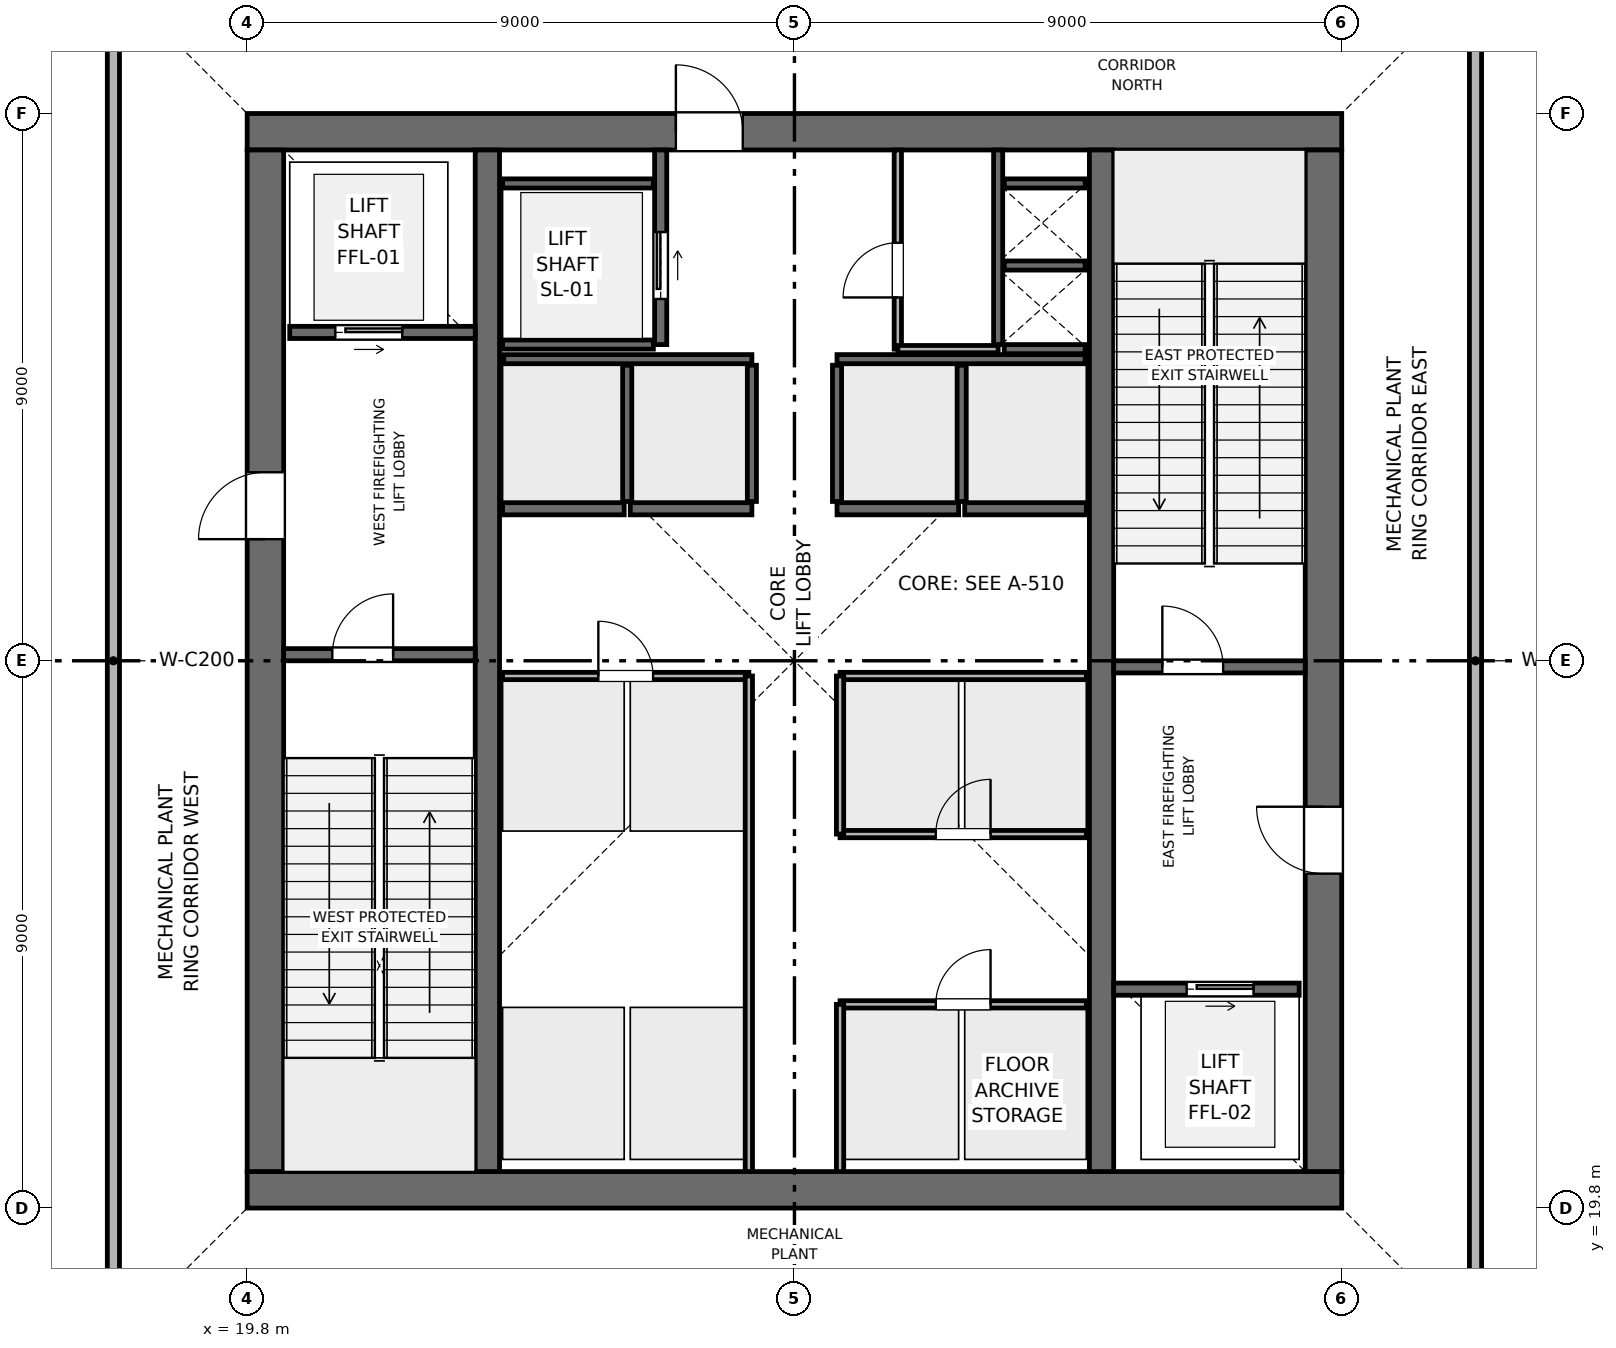
"""IFC4 building model, lengths in metres.
Left out: names, types, materials, properties, quantities, classifications, styles, units other than length and angle.
Written with IfcOpenShell. Run it as: python <this file> out.ifc"""

import sys

from ifc_helpers import new_model, si_unit, direction, frame, frame_2d, origin, place, context, subcontext, project, spatial, rectangle, extrude, element, fill, save


model = new_model("IFC4")
c1 = context("Model", 3, precision=1e-05, world=origin(), true_north=direction((0.0, 1.0)))
c2 = subcontext(c1, "Body", "Model", "MODEL_VIEW")
j1 = project(units=[si_unit("LENGTHUNIT", "METRE"), si_unit("PLANEANGLEUNIT", "RADIAN")], contexts=[c1])
p1 = place(None, origin())
s1 = spatial("IfcSite", under=j1, at=p1, CompositionType="ELEMENT")
p2 = place(p1, origin())
s2 = spatial("IfcBuilding", under=s1, at=p2, CompositionType="ELEMENT")
p3 = place(p2, frame((0.0, 0.0, 289.5)))
s3 = spatial("IfcBuildingStorey", under=s2, at=p3, CompositionType="ELEMENT", Elevation=289.5)
p4 = place(p3, frame((19.8, 20.1, 0.0), z_axis=(0.0, 0.0, 1.0), x_axis=(1.0, 0.0, 0.0)))
e1 = element("IfcWall", 1, at=p4, inside=s3, PredefinedType="SHEAR", context=c2, shape_type="SweptSolid", body=[
    extrude(rectangle(XDim=18.0, YDim=0.6, at=frame_2d((9.0, 0.0))), origin(), (0.0, 0.0, 1.0), 6.0),
])
p5 = place(p3, frame((19.8, 37.5, 0.0), z_axis=(0.0, 0.0, 1.0), x_axis=(1.0, 0.0, 0.0)))
e2 = element("IfcWall", 2, at=p5, inside=s3, PredefinedType="SHEAR", context=c2, shape_type="SweptSolid", body=[
    extrude(rectangle(XDim=18.0, YDim=0.6, at=frame_2d((9.0, 0.0))), origin(), (0.0, 0.0, 1.0), 6.0),
])
p6 = place(p5, frame((7.05, 0.0, 0.0)))
e3 = element("IfcOpeningElement", 3, at=p6, cuts=e2, PredefinedType="OPENING", context=c2, shape_type="SweptSolid", body=[
    extrude(rectangle(XDim=1.1, YDim=2.15, at=frame_2d((0.55, 1.075))), frame((0.0, 0.31, 0.0), z_axis=(0.0, -1.0, 0.0), x_axis=(1.0, 0.0, 0.0)), (0.0, 0.0, 1.0), 0.62),
])
p7 = place(p3, frame((20.1, 20.4, 0.0), z_axis=(0.0, 0.0, 1.0), x_axis=(0.0, 1.0, 0.0)))
e4 = element("IfcWall", 4, at=p7, inside=s3, PredefinedType="SHEAR", context=c2, shape_type="SweptSolid", body=[
    extrude(rectangle(XDim=16.8, YDim=0.6, at=frame_2d((8.4, 0.0))), origin(), (0.0, 0.0, 1.0), 6.0),
])
p8 = place(p7, frame((10.4, 0.0, 0.0)))
e5 = element("IfcOpeningElement", 5, at=p8, cuts=e4, PredefinedType="OPENING", context=c2, shape_type="SweptSolid", body=[
    extrude(rectangle(XDim=1.1, YDim=2.15, at=frame_2d((0.55, 1.075))), frame((0.0, 0.31, 0.0), z_axis=(0.0, -1.0, 0.0), x_axis=(1.0, 0.0, 0.0)), (0.0, 0.0, 1.0), 0.62),
])
p9 = place(p3, frame((37.5, 20.4, 0.0), z_axis=(0.0, 0.0, 1.0), x_axis=(0.0, 1.0, 0.0)))
e6 = element("IfcWall", 6, at=p9, inside=s3, PredefinedType="SHEAR", context=c2, shape_type="SweptSolid", body=[
    extrude(rectangle(XDim=16.8, YDim=0.6, at=frame_2d((8.4, 0.0))), origin(), (0.0, 0.0, 1.0), 6.0),
])
p10 = place(p9, frame((4.9, 0.0, 0.0)))
e7 = element("IfcOpeningElement", 7, at=p10, cuts=e6, PredefinedType="OPENING", context=c2, shape_type="SweptSolid", body=[
    extrude(rectangle(XDim=1.1, YDim=2.15, at=frame_2d((0.55, 1.075))), frame((0.0, 0.31, 0.0), z_axis=(0.0, -1.0, 0.0), x_axis=(1.0, 0.0, 0.0)), (0.0, 0.0, 1.0), 0.62),
])
for number, where, z_axis, x_axis in (
    (8, (23.75, 20.4, 0.0), (0.0, 0.0, 1.0), (0.0, 1.0, 0.0)),
    (9, (33.85, 20.4, 0.0), (0.0, 0.0, 1.0), (0.0, 1.0, 0.0)),
):
    element("IfcWall", number, at=place(p3, frame(where, z_axis=z_axis, x_axis=x_axis)), inside=s3, PredefinedType="SHEAR", context=c2, shape_type="SweptSolid", body=[
        extrude(rectangle(XDim=16.8, YDim=0.4, at=frame_2d((8.4, 0.0))), origin(), (0.0, 0.0, 1.0), 6.0),
    ])
p11 = place(p3, frame((20.4, 28.9, 0.0), z_axis=(0.0, 0.0, 1.0), x_axis=(1.0, 0.0, 0.0)))
e10 = element("IfcWall", 10, at=p11, inside=s3, PredefinedType="SHEAR", context=c2, shape_type="SweptSolid", body=[
    extrude(rectangle(XDim=3.15, YDim=0.2, at=frame_2d((1.575, 0.0))), origin(), (0.0, 0.0, 1.0), 5.76),
])
p12 = place(p11, frame((0.8, 0.0, 0.0)))
e11 = element("IfcOpeningElement", 11, at=p12, cuts=e10, PredefinedType="OPENING", context=c2, shape_type="SweptSolid", body=[
    extrude(rectangle(XDim=1.0, YDim=2.1, at=frame_2d((0.5, 1.05))), frame((0.0, 0.11, 0.0), z_axis=(0.0, -1.0, 0.0), x_axis=(1.0, 0.0, 0.0)), (0.0, 0.0, 1.0), 0.22),
])
p13 = place(p3, frame((34.05, 28.7, 0.0), z_axis=(0.0, 0.0, 1.0), x_axis=(1.0, 0.0, 0.0)))
e12 = element("IfcWall", 12, at=p13, inside=s3, PredefinedType="SHEAR", context=c2, shape_type="SweptSolid", body=[
    extrude(rectangle(XDim=3.15, YDim=0.2, at=frame_2d((1.575, 0.0))), origin(), (0.0, 0.0, 1.0), 5.76),
])
p14 = place(p13, frame((0.8, 0.0, 0.0)))
e13 = element("IfcOpeningElement", 13, at=p14, cuts=e12, PredefinedType="OPENING", context=c2, shape_type="SweptSolid", body=[
    extrude(rectangle(XDim=1.0, YDim=2.1, at=frame_2d((0.5, 1.05))), frame((0.0, 0.11, 0.0), z_axis=(0.0, -1.0, 0.0), x_axis=(1.0, 0.0, 0.0)), (0.0, 0.0, 1.0), 0.22),
])
p15 = place(p3, frame((32.15, 34.0, 0.0), z_axis=(0.0, 0.0, 1.0), x_axis=(0.0, 1.0, 0.0)))
e14 = element("IfcWall", 14, at=p15, inside=s3, PredefinedType="SHEAR", context=c2, shape_type="SweptSolid", body=[
    extrude(rectangle(XDim=3.2, YDim=0.15, at=frame_2d((1.6, 0.0))), origin(), (0.0, 0.0, 1.0), 5.76),
])
for number, where, z_axis, x_axis in (
    (15, (32.25, 33.925, 0.0), (0.0, 0.0, 1.0), (1.0, 0.0, 0.0)),
    (16, (32.25, 35.3, 0.0), (0.0, 0.0, 1.0), (1.0, 0.0, 0.0)),
):
    element("IfcWall", number, at=place(p3, frame(where, z_axis=z_axis, x_axis=x_axis)), inside=s3, PredefinedType="SHEAR", context=c2, shape_type="SweptSolid", body=[
        extrude(rectangle(XDim=1.33, YDim=0.15, at=frame_2d((0.665, 0.0))), origin(), (0.0, 0.0, 1.0), 5.76),
    ])
p16 = place(p3, frame((20.5, 34.2, 0.0), z_axis=(0.0, 0.0, 1.0), x_axis=(1.0, 0.0, 0.0)))
e17 = element("IfcWall", 17, at=p16, inside=s3, PredefinedType="SHEAR", context=c2, shape_type="SweptSolid", body=[
    extrude(rectangle(XDim=3.05, YDim=0.2, at=frame_2d((1.525, 0.0))), origin(), (0.0, 0.0, 1.0), 5.76),
])
p17 = place(p16, frame((0.75, 0.0, 0.0)))
e18 = element("IfcOpeningElement", 18, at=p17, cuts=e17, PredefinedType="OPENING", context=c2, shape_type="SweptSolid", body=[
    extrude(rectangle(XDim=1.1, YDim=2.15, at=frame_2d((0.55, 1.075))), frame((0.0, 0.11, 0.0), z_axis=(0.0, -1.0, 0.0), x_axis=(1.0, 0.0, 0.0)), (0.0, 0.0, 1.0), 0.22),
])
p18 = place(p3, frame((34.05, 23.4, 0.0), z_axis=(0.0, 0.0, 1.0), x_axis=(1.0, 0.0, 0.0)))
e19 = element("IfcWall", 19, at=p18, inside=s3, PredefinedType="SHEAR", context=c2, shape_type="SweptSolid", body=[
    extrude(rectangle(XDim=3.05, YDim=0.2, at=frame_2d((1.525, 0.0))), origin(), (0.0, 0.0, 1.0), 5.76),
])
p19 = place(p18, frame((1.2, 0.0, 0.0)))
e20 = element("IfcOpeningElement", 20, at=p19, cuts=e19, PredefinedType="OPENING", context=c2, shape_type="SweptSolid", body=[
    extrude(rectangle(XDim=1.1, YDim=2.15, at=frame_2d((0.55, 1.075))), frame((0.0, 0.11, 0.0), z_axis=(0.0, -1.0, 0.0), x_axis=(1.0, 0.0, 0.0)), (0.0, 0.0, 1.0), 0.22),
])
p20 = place(p3, frame((26.6, 34.0, 0.0), z_axis=(0.0, 0.0, 1.0), x_axis=(0.0, 1.0, 0.0)))
e21 = element("IfcWall", 21, at=p20, inside=s3, PredefinedType="SHEAR", context=c2, shape_type="SweptSolid", body=[
    extrude(rectangle(XDim=3.2, YDim=0.2, at=frame_2d((1.6, 0.0))), origin(), (0.0, 0.0, 1.0), 5.76),
])
p21 = place(p20, frame((0.75, 0.0, 0.0)))
e22 = element("IfcOpeningElement", 22, at=p21, cuts=e21, PredefinedType="OPENING", context=c2, shape_type="SweptSolid", body=[
    extrude(rectangle(XDim=1.1, YDim=2.15, at=frame_2d((0.55, 1.075))), frame((0.0, 0.11, 0.0), z_axis=(0.0, -1.0, 0.0), x_axis=(1.0, 0.0, 0.0)), (0.0, 0.0, 1.0), 0.22),
])
for number, where, z_axis, x_axis in (
    (23, (24.0, 34.0, 0.0), (0.0, 0.0, 1.0), (1.0, 0.0, 0.0)),
    (24, (24.0, 36.65, 0.0), (0.0, 0.0, 1.0), (1.0, 0.0, 0.0)),
):
    element("IfcWall", number, at=place(p3, frame(where, z_axis=z_axis, x_axis=x_axis)), inside=s3, PredefinedType="SHEAR", context=c2, shape_type="SweptSolid", body=[
        extrude(rectangle(XDim=2.48, YDim=0.15, at=frame_2d((1.24, 0.0))), origin(), (0.0, 0.0, 1.0), 5.76),
    ])
for number, where, z_axis, x_axis in (
    (25, (24.0, 31.3, 0.0), (0.0, 0.0, 1.0), (1.0, 0.0, 0.0)),
    (26, (26.1, 31.3, 0.0), (0.0, 0.0, 1.0), (1.0, 0.0, 0.0)),
    (27, (29.5, 31.3, 0.0), (0.0, 0.0, 1.0), (1.0, 0.0, 0.0)),
    (28, (31.6, 31.3, 0.0), (0.0, 0.0, 1.0), (1.0, 0.0, 0.0)),
):
    element("IfcWall", number, at=place(p3, frame(where, z_axis=z_axis, x_axis=x_axis)), inside=s3, PredefinedType="SHEAR", context=c2, shape_type="SweptSolid", body=[
        extrude(rectangle(XDim=2.0, YDim=0.2, at=frame_2d((1.0, 0.0))), origin(), (0.0, 0.0, 1.0), 5.76),
    ])
p22 = place(p3, frame((32.25, 36.65, 0.0), z_axis=(0.0, 0.0, 1.0), x_axis=(1.0, 0.0, 0.0)))
e29 = element("IfcWall", 29, at=p22, inside=s3, PredefinedType="SHEAR", context=c2, shape_type="SweptSolid", body=[
    extrude(rectangle(XDim=1.33, YDim=0.15, at=frame_2d((0.665, 0.0))), origin(), (0.0, 0.0, 1.0), 5.76),
])
for number, where, z_axis, x_axis in (
    (30, (24.02, 33.76, 0.0), (0.0, 0.0, 1.0), (1.0, 0.0, 0.0)),
    (31, (29.5, 33.76, 0.0), (0.0, 0.0, 1.0), (1.0, 0.0, 0.0)),
):
    element("IfcWall", number, at=place(p3, frame(where, z_axis=z_axis, x_axis=x_axis)), inside=s3, PredefinedType="SHEAR", context=c2, shape_type="SweptSolid", body=[
        extrude(rectangle(XDim=4.08, YDim=0.15, at=frame_2d((2.04, 0.0))), origin(), (0.0, 0.0, 1.0), 5.76),
    ])
for number, where, z_axis, x_axis in (
    (32, (26.05, 31.42, 0.0), (0.0, 0.0, 1.0), (0.0, 1.0, 0.0)),
    (33, (28.1, 31.42, 0.0), (0.0, 0.0, 1.0), (0.0, 1.0, 0.0)),
    (34, (29.5, 31.42, 0.0), (0.0, 0.0, 1.0), (0.0, 1.0, 0.0)),
    (35, (31.55, 31.42, 0.0), (0.0, 0.0, 1.0), (0.0, 1.0, 0.0)),
):
    element("IfcWall", number, at=place(p3, frame(where, z_axis=z_axis, x_axis=x_axis)), inside=s3, PredefinedType="SHEAR", context=c2, shape_type="SweptSolid", body=[
        extrude(rectangle(XDim=2.24, YDim=0.15, at=frame_2d((1.12, 0.0))), origin(), (0.0, 0.0, 1.0), 5.76),
    ])
p23 = place(p3, frame((30.5, 33.925, 0.0), z_axis=(0.0, 0.0, 1.0), x_axis=(0.0, 1.0, 0.0)))
e36 = element("IfcWall", 36, at=p23, inside=s3, PredefinedType="PARTITIONING", context=c2, shape_type="SweptSolid", body=[
    extrude(rectangle(XDim=3.275, YDim=0.12, at=frame_2d((1.637, 0.0))), origin(), (0.0, 0.0, 1.0), 5.76),
])
p24 = place(p23, frame((0.85, 0.0, 0.0)))
e37 = element("IfcOpeningElement", 37, at=p24, cuts=e36, PredefinedType="OPENING", context=c2, shape_type="SweptSolid", body=[
    extrude(rectangle(XDim=0.9, YDim=2.1, at=frame_2d((0.45, 1.05))), frame((0.0, 0.07, 0.0), z_axis=(0.0, -1.0, 0.0), x_axis=(1.0, 0.0, 0.0)), (0.0, 0.0, 1.0), 0.14),
])
p25 = place(p3, frame((30.5, 33.925, 0.0), z_axis=(0.0, 0.0, 1.0), x_axis=(1.0, 0.0, 0.0)))
e38 = element("IfcWall", 38, at=p25, inside=s3, PredefinedType="PARTITIONING", context=c2, shape_type="SweptSolid", body=[
    extrude(rectangle(XDim=1.65, YDim=0.12, at=frame_2d((0.825, 0.0))), origin(), (0.0, 0.0, 1.0), 5.76),
])
p26 = place(p3, frame((24.0, 28.55, 0.0), z_axis=(0.0, 0.0, 1.0), x_axis=(1.0, 0.0, 0.0)))
e39 = element("IfcWall", 39, at=p26, inside=s3, PredefinedType="PARTITIONING", context=c2, shape_type="SweptSolid", body=[
    extrude(rectangle(XDim=4.05, YDim=0.12, at=frame_2d((2.025, 0.0))), origin(), (0.0, 0.0, 1.0), 5.76),
])
p27 = place(p26, frame((1.575, 0.0, 0.0)))
e40 = element("IfcOpeningElement", 40, at=p27, cuts=e39, PredefinedType="OPENING", context=c2, shape_type="SweptSolid", body=[
    extrude(rectangle(XDim=0.9, YDim=2.1, at=frame_2d((0.45, 1.05))), frame((0.0, 0.07, 0.0), z_axis=(0.0, -1.0, 0.0), x_axis=(1.0, 0.0, 0.0)), (0.0, 0.0, 1.0), 0.14),
])
p28 = place(p3, frame((28.05, 20.4, 0.0), z_axis=(0.0, 0.0, 1.0), x_axis=(0.0, 1.0, 0.0)))
e41 = element("IfcWall", 41, at=p28, inside=s3, PredefinedType="PARTITIONING", context=c2, shape_type="SweptSolid", body=[
    extrude(rectangle(XDim=8.15, YDim=0.12, at=frame_2d((4.075, 0.0))), origin(), (0.0, 0.0, 1.0), 5.76),
])
p29 = place(p3, frame((29.55, 23.15, 0.0), z_axis=(0.0, 0.0, 1.0), x_axis=(1.0, 0.0, 0.0)))
e42 = element("IfcWall", 42, at=p29, inside=s3, PredefinedType="PARTITIONING", context=c2, shape_type="SweptSolid", body=[
    extrude(rectangle(XDim=4.05, YDim=0.12, at=frame_2d((2.025, 0.0))), origin(), (0.0, 0.0, 1.0), 5.76),
])
p30 = place(p29, frame((1.575, 0.0, 0.0)))
e43 = element("IfcOpeningElement", 43, at=p30, cuts=e42, PredefinedType="OPENING", context=c2, shape_type="SweptSolid", body=[
    extrude(rectangle(XDim=0.9, YDim=2.1, at=frame_2d((0.45, 1.05))), frame((0.0, 0.07, 0.0), z_axis=(0.0, -1.0, 0.0), x_axis=(1.0, 0.0, 0.0)), (0.0, 0.0, 1.0), 0.14),
])
p31 = place(p3, frame((29.55, 20.4, 0.0), z_axis=(0.0, 0.0, 1.0), x_axis=(0.0, 1.0, 0.0)))
e44 = element("IfcWall", 44, at=p31, inside=s3, PredefinedType="PARTITIONING", context=c2, shape_type="SweptSolid", body=[
    extrude(rectangle(XDim=2.75, YDim=0.12, at=frame_2d((1.375, 0.0))), origin(), (0.0, 0.0, 1.0), 5.76),
])
p32 = place(p3, frame((29.55, 25.95, 0.0), z_axis=(0.0, 0.0, 1.0), x_axis=(1.0, 0.0, 0.0)))
e45 = element("IfcWall", 45, at=p32, inside=s3, PredefinedType="PARTITIONING", context=c2, shape_type="SweptSolid", body=[
    extrude(rectangle(XDim=4.05, YDim=0.12, at=frame_2d((2.025, 0.0))), origin(), (0.0, 0.0, 1.0), 5.76),
])
p33 = place(p32, frame((1.575, 0.0, 0.0)))
e46 = element("IfcOpeningElement", 46, at=p33, cuts=e45, PredefinedType="OPENING", context=c2, shape_type="SweptSolid", body=[
    extrude(rectangle(XDim=0.9, YDim=2.1, at=frame_2d((0.45, 1.05))), frame((0.0, 0.07, 0.0), z_axis=(0.0, -1.0, 0.0), x_axis=(1.0, 0.0, 0.0)), (0.0, 0.0, 1.0), 0.14),
])
p34 = place(p3, frame((29.55, 28.55, 0.0), z_axis=(0.0, 0.0, 1.0), x_axis=(1.0, 0.0, 0.0)))
e47 = element("IfcWall", 47, at=p34, inside=s3, PredefinedType="PARTITIONING", context=c2, shape_type="SweptSolid", body=[
    extrude(rectangle(XDim=4.05, YDim=0.12, at=frame_2d((2.025, 0.0))), origin(), (0.0, 0.0, 1.0), 5.76),
])
p35 = place(p3, frame((29.55, 25.95, 0.0), z_axis=(0.0, 0.0, 1.0), x_axis=(0.0, 1.0, 0.0)))
e48 = element("IfcWall", 48, at=p35, inside=s3, PredefinedType="PARTITIONING", context=c2, shape_type="SweptSolid", body=[
    extrude(rectangle(XDim=2.6, YDim=0.12, at=frame_2d((1.3, 0.0))), origin(), (0.0, 0.0, 1.0), 5.76),
])
for number, where, z_axis, x_axis in (
    (49, (17.6, 17.6, 0.0), (0.0, 0.0, 1.0), (0.0, 1.0, 0.0)),
    (50, (40.0, 17.6, 0.0), (0.0, 0.0, 1.0), (0.0, 1.0, 0.0)),
):
    element("IfcWall", number, at=place(p3, frame(where, z_axis=z_axis, x_axis=x_axis)), inside=s3, PredefinedType="PARTITIONING", context=c2, shape_type="SweptSolid", body=[
        extrude(rectangle(XDim=22.4, YDim=0.2, at=frame_2d((11.2, 0.0))), origin(), (0.0, 0.0, 1.0), 5.345),
    ])
p36 = place(p12, origin())
e51 = element("IfcDoor", 51, at=p36, inside=s3, OperationType="SINGLE_SWING_RIGHT", PredefinedType="DOOR", context=c2, shape_type="SweptSolid", body=[
    extrude(rectangle(XDim=1.0, YDim=2.1, at=frame_2d((0.5, 1.05))), frame((0.0, 0.025, 0.0), z_axis=(0.0, -1.0, 0.0), x_axis=(1.0, 0.0, 0.0)), (0.0, 0.0, 1.0), 0.05),
])
fill(e11, e51)
p37 = place(p14, origin())
e52 = element("IfcDoor", 52, at=p37, inside=s3, OperationType="SINGLE_SWING_LEFT", PredefinedType="DOOR", context=c2, shape_type="SweptSolid", body=[
    extrude(rectangle(XDim=1.0, YDim=2.1, at=frame_2d((0.5, 1.05))), frame((0.0, 0.025, 0.0), z_axis=(0.0, -1.0, 0.0), x_axis=(1.0, 0.0, 0.0)), (0.0, 0.0, 1.0), 0.05),
])
fill(e13, e52)
p38 = place(p17, origin())
e53 = element("IfcDoor", 53, at=p38, inside=s3, OperationType="SLIDING_TO_RIGHT", PredefinedType="DOOR", context=c2, shape_type="SweptSolid", body=[
    extrude(rectangle(XDim=1.1, YDim=2.15, at=frame_2d((0.55, 1.075))), frame((0.0, 0.025, 0.0), z_axis=(0.0, -1.0, 0.0), x_axis=(1.0, 0.0, 0.0)), (0.0, 0.0, 1.0), 0.05),
])
fill(e18, e53)
p39 = place(p19, origin())
e54 = element("IfcDoor", 54, at=p39, inside=s3, OperationType="SLIDING_TO_RIGHT", PredefinedType="DOOR", context=c2, shape_type="SweptSolid", body=[
    extrude(rectangle(XDim=1.1, YDim=2.15, at=frame_2d((0.55, 1.075))), frame((0.0, 0.025, 0.0), z_axis=(0.0, -1.0, 0.0), x_axis=(1.0, 0.0, 0.0)), (0.0, 0.0, 1.0), 0.05),
])
fill(e20, e54)
p40 = place(p21, origin())
e55 = element("IfcDoor", 55, at=p40, inside=s3, OperationType="SLIDING_TO_RIGHT", PredefinedType="DOOR", context=c2, shape_type="SweptSolid", body=[
    extrude(rectangle(XDim=1.1, YDim=2.15, at=frame_2d((0.55, 1.075))), frame((0.0, 0.025, 0.0), z_axis=(0.0, -1.0, 0.0), x_axis=(1.0, 0.0, 0.0)), (0.0, 0.0, 1.0), 0.05),
])
fill(e22, e55)
p41 = place(p24, origin())
e56 = element("IfcDoor", 56, at=p41, inside=s3, OperationType="SINGLE_SWING_LEFT", PredefinedType="DOOR", context=c2, shape_type="SweptSolid", body=[
    extrude(rectangle(XDim=0.9, YDim=2.1, at=frame_2d((0.45, 1.05))), frame((0.0, 0.025, 0.0), z_axis=(0.0, -1.0, 0.0), x_axis=(1.0, 0.0, 0.0)), (0.0, 0.0, 1.0), 0.05),
])
fill(e37, e56)
p42 = place(p27, origin())
e57 = element("IfcDoor", 57, at=p42, inside=s3, OperationType="SINGLE_SWING_LEFT", PredefinedType="DOOR", context=c2, shape_type="SweptSolid", body=[
    extrude(rectangle(XDim=0.9, YDim=2.1, at=frame_2d((0.45, 1.05))), frame((0.0, 0.025, 0.0), z_axis=(0.0, -1.0, 0.0), x_axis=(1.0, 0.0, 0.0)), (0.0, 0.0, 1.0), 0.05),
])
fill(e40, e57)
p43 = place(p30, origin())
e58 = element("IfcDoor", 58, at=p43, inside=s3, OperationType="SINGLE_SWING_RIGHT", PredefinedType="DOOR", context=c2, shape_type="SweptSolid", body=[
    extrude(rectangle(XDim=0.9, YDim=2.1, at=frame_2d((0.45, 1.05))), frame((0.0, 0.025, 0.0), z_axis=(0.0, -1.0, 0.0), x_axis=(1.0, 0.0, 0.0)), (0.0, 0.0, 1.0), 0.05),
])
fill(e43, e58)
p44 = place(p33, origin())
e59 = element("IfcDoor", 59, at=p44, inside=s3, OperationType="SINGLE_SWING_RIGHT", PredefinedType="DOOR", context=c2, shape_type="SweptSolid", body=[
    extrude(rectangle(XDim=0.9, YDim=2.1, at=frame_2d((0.45, 1.05))), frame((0.0, 0.025, 0.0), z_axis=(0.0, -1.0, 0.0), x_axis=(1.0, 0.0, 0.0)), (0.0, 0.0, 1.0), 0.05),
])
fill(e46, e59)
p45 = place(p8, origin())
e60 = element("IfcDoor", 60, at=p45, inside=s3, OperationType="SINGLE_SWING_LEFT", PredefinedType="DOOR", context=c2, shape_type="SweptSolid", body=[
    extrude(rectangle(XDim=1.1, YDim=2.15, at=frame_2d((0.55, 1.075))), frame((0.0, 0.025, 0.0), z_axis=(0.0, -1.0, 0.0), x_axis=(1.0, 0.0, 0.0)), (0.0, 0.0, 1.0), 0.05),
])
fill(e5, e60)
p46 = place(p10, origin())
e61 = element("IfcDoor", 61, at=p46, inside=s3, OperationType="SINGLE_SWING_RIGHT", PredefinedType="DOOR", context=c2, shape_type="SweptSolid", body=[
    extrude(rectangle(XDim=1.1, YDim=2.15, at=frame_2d((0.55, 1.075))), frame((0.0, 0.025, 0.0), z_axis=(0.0, -1.0, 0.0), x_axis=(1.0, 0.0, 0.0)), (0.0, 0.0, 1.0), 0.05),
])
fill(e7, e61)
p47 = place(p6, origin())
e62 = element("IfcDoor", 62, at=p47, inside=s3, OperationType="SINGLE_SWING_LEFT", PredefinedType="DOOR", context=c2, shape_type="SweptSolid", body=[
    extrude(rectangle(XDim=1.1, YDim=2.15, at=frame_2d((0.55, 1.075))), frame((0.0, 0.025, 0.0), z_axis=(0.0, -1.0, 0.0), x_axis=(1.0, 0.0, 0.0)), (0.0, 0.0, 1.0), 0.05),
])
fill(e3, e62)
save(model, sys.argv[1])
